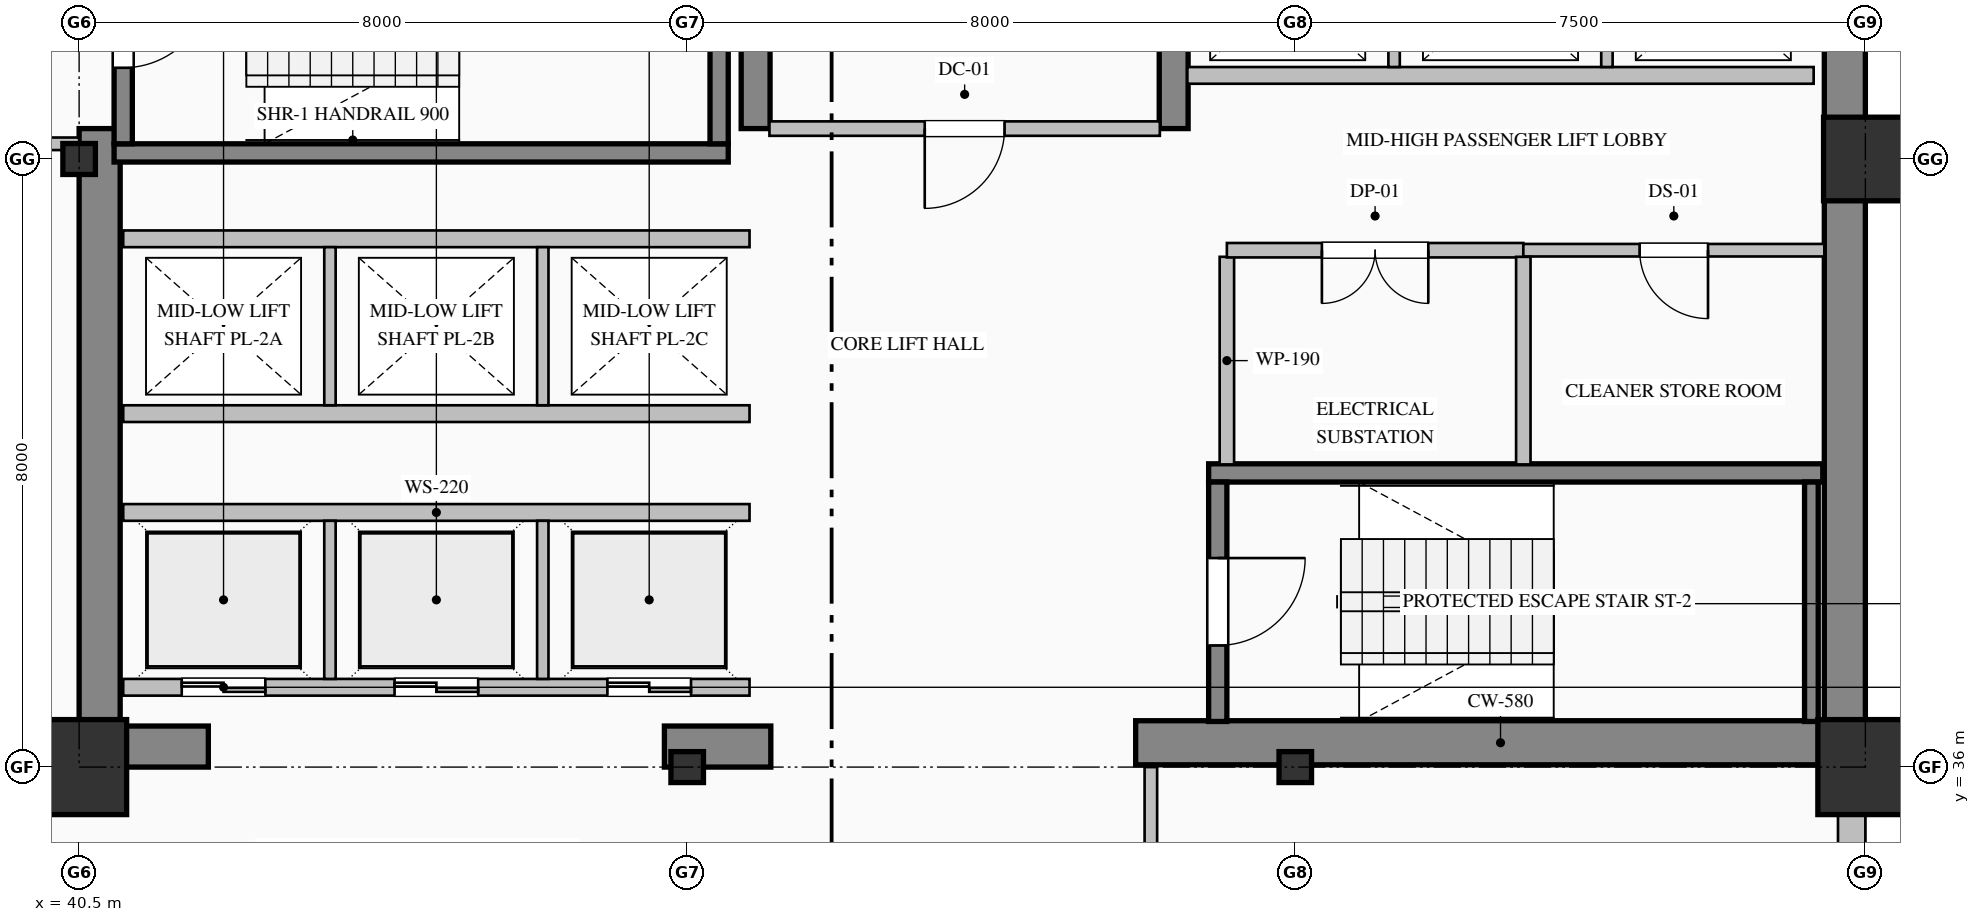
"""IFC4 building model, lengths in metres.
Left out: names, types, materials, properties, quantities, classifications, styles, units other than length and angle.
Written with IfcOpenShell. Run it as: python <this file> out.ifc"""

import sys

from ifc_helpers import new_model, si_unit, direction, frame, frame_2d, origin, origin_2d, place, context, subcontext, project, spatial, rectangle, hollow_rectangle, i_section, extrude, element, fill, save


model = new_model("IFC4")
c1 = context("Model", 3, precision=1e-05, world=origin(), true_north=direction((0.0, 1.0)))
c2 = subcontext(c1, "Body", "Model", "MODEL_VIEW")
j1 = project(units=[si_unit("LENGTHUNIT", "METRE"), si_unit("PLANEANGLEUNIT", "RADIAN")], contexts=[c1])
p1 = place(None, origin())
s1 = spatial("IfcSite", under=j1, at=p1, CompositionType="ELEMENT")
p2 = place(p1, origin())
s2 = spatial("IfcBuilding", under=s1, at=p2, CompositionType="ELEMENT")
p3 = place(p2, frame((0.0, 0.0, 84.2)))
s3 = spatial("IfcBuildingStorey", under=s2, at=p3, CompositionType="ELEMENT", Elevation=84.2)
p4 = place(p3, frame((63.73, 36.32, 0.0), z_axis=(0.0, 0.0, 1.0), x_axis=(0.0, 1.0, 0.0)))
e1 = element("IfcWall", 1, at=p4, inside=s3, PredefinedType="SHEAR", context=c2, shape_type="SweptSolid", body=[
    extrude(rectangle(XDim=15.14, YDim=0.54, at=frame_2d((7.57, 0.0))), origin(), (0.0, 0.0, 1.0), 3.75),
])
p5 = place(p3, frame((40.77, 36.54, 0.0), z_axis=(0.0, 0.0, 1.0), x_axis=(0.0, 1.0, 0.0)))
e2 = element("IfcWall", 2, at=p5, inside=s3, PredefinedType="SHEAR", context=c2, shape_type="SweptSolid", body=[
    extrude(rectangle(XDim=7.86, YDim=0.54, at=frame_2d((3.93, 0.0))), origin(), (0.0, 0.0, 1.0), 3.75),
])
p6 = place(p3, frame((40.5, 36.27, 0.0), z_axis=(0.0, 0.0, 1.0), x_axis=(1.0, 0.0, 0.0)))
e3 = element("IfcWall", 3, at=p6, inside=s3, PredefinedType="SHEAR", context=c2, shape_type="SweptSolid", body=[
    extrude(rectangle(XDim=1.7, YDim=0.54, at=frame_2d((0.85, 0.0))), origin(), (0.0, 0.0, 1.0), 3.75),
])
p7 = place(p3, frame((48.2, 36.27, 0.0), z_axis=(0.0, 0.0, 1.0), x_axis=(1.0, 0.0, 0.0)))
e4 = element("IfcWall", 4, at=p7, inside=s3, PredefinedType="SHEAR", context=c2, shape_type="SweptSolid", body=[
    extrude(rectangle(XDim=1.4, YDim=0.54, at=frame_2d((0.7, 0.0))), origin(), (0.0, 0.0, 1.0), 3.75),
])
p8 = place(p3, frame((54.4, 36.32, 0.0), z_axis=(0.0, 0.0, 1.0), x_axis=(1.0, 0.0, 0.0)))
e5 = element("IfcWall", 5, at=p8, inside=s3, PredefinedType="SHEAR", context=c2, shape_type="SweptSolid", body=[
    extrude(rectangle(XDim=9.6, YDim=0.58, at=frame_2d((4.8, 0.0))), origin(), (0.0, 0.0, 1.0), 4.0),
])
p9 = place(p3, frame((49.4, 44.4, 0.0), z_axis=(0.0, 0.0, 1.0), x_axis=(0.0, 1.0, 0.0)))
e6 = element("IfcWall", 6, at=p9, inside=s3, PredefinedType="SHEAR", context=c2, shape_type="SweptSolid", body=[
    extrude(rectangle(XDim=3.0, YDim=0.38, at=frame_2d((1.5, 0.0))), origin(), (0.0, 0.0, 1.0), 3.75),
])
p10 = place(p3, frame((54.9, 44.4, 0.0), z_axis=(0.0, 0.0, 1.0), x_axis=(0.0, 1.0, 0.0)))
e7 = element("IfcWall", 7, at=p10, inside=s3, PredefinedType="SHEAR", context=c2, shape_type="SweptSolid", body=[
    extrude(rectangle(XDim=7.06, YDim=0.38, at=frame_2d((3.53, 0.0))), origin(), (0.0, 0.0, 1.0), 3.75),
])
p11 = place(p3, frame((40.5, 36.0, 0.0), z_axis=(0.0, 0.0, 1.0), x_axis=(1.0, 0.0, 0.0)))
e8 = element("IfcColumn", 8, at=p11, inside=s3, PredefinedType="COLUMN", context=c2, shape_type="SweptSolid", body=[
    extrude(hollow_rectangle(XDim=1.25, YDim=1.25, WallThickness=0.045, at=origin_2d()), origin(), (0.0, 0.0, 1.0), 4.0),
])
for number, where, z_axis, x_axis in (
    (9, (40.5, 44.0, 0.0), (0.0, 0.0, 1.0), (1.0, 0.0, 0.0)),
    (10, (48.5, 36.0, 0.0), (0.0, 0.0, 1.0), (1.0, 0.0, 0.0)),
    (11, (56.5, 36.0, 0.0), (0.0, 0.0, 1.0), (1.0, 0.0, 0.0)),
):
    element("IfcColumn", number, at=place(p3, frame(where, z_axis=z_axis, x_axis=x_axis)), inside=s3, PredefinedType="COLUMN", context=c2, shape_type="SweptSolid", body=[
        extrude(i_section(OverallWidth=0.407, OverallDepth=0.428, WebThickness=0.02, FlangeThickness=0.035, FilletRadius=0.022, at=origin_2d()), origin(), (0.0, 0.0, 1.0), 4.0),
    ])
p12 = place(p3, frame((64.0, 36.0, 0.0), z_axis=(0.0, 0.0, 1.0), x_axis=(1.0, 0.0, 0.0)))
e12 = element("IfcColumn", 12, at=p12, inside=s3, PredefinedType="COLUMN", context=c2, shape_type="SweptSolid", body=[
    extrude(hollow_rectangle(XDim=1.25, YDim=1.25, WallThickness=0.045, at=origin_2d()), origin(), (0.0, 0.0, 1.0), 4.0),
])
p13 = place(p3, frame((64.0, 44.0, 0.0), z_axis=(0.0, 0.0, 1.0), x_axis=(1.0, 0.0, 0.0)))
e13 = element("IfcColumn", 13, at=p13, inside=s3, PredefinedType="COLUMN", context=c2, shape_type="SweptSolid", body=[
    extrude(hollow_rectangle(XDim=1.1, YDim=1.1, WallThickness=0.04, at=origin_2d()), origin(), (0.0, 0.0, 1.0), 4.0),
])
p14 = place(p3, frame((63.82, 36.05, 0.0), z_axis=(0.0, 0.0, 1.0), x_axis=(0.0, -1.0, 0.0)))
e14 = element("IfcWall", 14, at=p14, inside=s3, PredefinedType="SOLIDWALL", context=c2, shape_type="SweptSolid", body=[
    extrude(rectangle(XDim=28.05, YDim=0.36, at=frame_2d((14.025, 0.0))), origin(), (0.0, 0.0, 1.0), 3.25),
])
p15 = place(p14, frame((2.4, 0.0, 0.8)))
e15 = element("IfcOpeningElement", 15, at=p15, cuts=e14, PredefinedType="OPENING", context=c2, shape_type="SweptSolid", body=[
    extrude(rectangle(XDim=2.4, YDim=2.15, at=frame_2d((1.2, 1.075))), frame((0.0, 0.19, 0.0), z_axis=(0.0, -1.0, 0.0), x_axis=(1.0, 0.0, 0.0)), (0.0, 0.0, 1.0), 0.38),
])
p16 = place(p14, frame((13.2, 0.0, 0.8)))
e16 = element("IfcOpeningElement", 16, at=p16, cuts=e14, PredefinedType="OPENING", context=c2, shape_type="SweptSolid", body=[
    extrude(rectangle(XDim=2.4, YDim=2.15, at=frame_2d((1.2, 1.075))), frame((0.0, 0.19, 0.0), z_axis=(0.0, -1.0, 0.0), x_axis=(1.0, 0.0, 0.0)), (0.0, 0.0, 1.0), 0.38),
])
p17 = place(p3, frame((49.04, 44.08, 0.0), z_axis=(0.0, 0.0, 1.0), x_axis=(-1.0, 0.0, 0.0)))
e17 = element("IfcWall", 17, at=p17, inside=s3, PredefinedType="SOLIDWALL", context=c2, shape_type="SweptSolid", body=[
    extrude(rectangle(XDim=8.08, YDim=0.24, at=frame_2d((4.04, 0.0))), origin(), (0.0, 0.0, 1.0), 4.0),
])
p18 = place(p3, frame((41.08, 47.35, 0.0), z_axis=(0.0, 0.0, 1.0), x_axis=(0.0, -1.0, 0.0)))
e18 = element("IfcWall", 18, at=p18, inside=s3, PredefinedType="SOLIDWALL", context=c2, shape_type="SweptSolid", body=[
    extrude(rectangle(XDim=3.15, YDim=0.24, at=frame_2d((1.575, 0.0))), origin(), (0.0, 0.0, 1.0), 4.0),
])
p19 = place(p18, frame((1.0, 0.0, 0.0)))
e19 = element("IfcOpeningElement", 19, at=p19, cuts=e18, PredefinedType="OPENING", context=c2, shape_type="SweptSolid", body=[
    extrude(rectangle(XDim=1.15, YDim=2.2, at=frame_2d((0.575, 1.1))), frame((0.0, 0.13, 0.0), z_axis=(0.0, -1.0, 0.0), x_axis=(1.0, 0.0, 0.0)), (0.0, 0.0, 1.0), 0.26),
])
p20 = place(p3, frame((48.92, 44.2, 0.0), z_axis=(0.0, 0.0, 1.0), x_axis=(0.0, 1.0, 0.0)))
e20 = element("IfcWall", 20, at=p20, inside=s3, PredefinedType="SOLIDWALL", context=c2, shape_type="SweptSolid", body=[
    extrude(rectangle(XDim=3.15, YDim=0.24, at=frame_2d((1.575, 0.0))), origin(), (0.0, 0.0, 1.0), 4.0),
])
p21 = place(p3, frame((55.36, 39.87, 0.0), z_axis=(0.0, 0.0, 1.0), x_axis=(1.0, 0.0, 0.0)))
e21 = element("IfcWall", 21, at=p21, inside=s3, PredefinedType="SOLIDWALL", context=c2, shape_type="SweptSolid", body=[
    extrude(rectangle(XDim=8.08, YDim=0.24, at=frame_2d((4.04, 0.0))), origin(), (0.0, 0.0, 1.0), 4.0),
])
p22 = place(p3, frame((55.48, 39.75, 0.0), z_axis=(0.0, 0.0, 1.0), x_axis=(0.0, -1.0, 0.0)))
e22 = element("IfcWall", 22, at=p22, inside=s3, PredefinedType="SOLIDWALL", context=c2, shape_type="SweptSolid", body=[
    extrude(rectangle(XDim=3.15, YDim=0.24, at=frame_2d((1.575, 0.0))), origin(), (0.0, 0.0, 1.0), 4.0),
])
p23 = place(p22, frame((1.0, 0.0, 0.0)))
e23 = element("IfcOpeningElement", 23, at=p23, cuts=e22, PredefinedType="OPENING", context=c2, shape_type="SweptSolid", body=[
    extrude(rectangle(XDim=1.15, YDim=2.2, at=frame_2d((0.575, 1.1))), frame((0.0, 0.13, 0.0), z_axis=(0.0, -1.0, 0.0), x_axis=(1.0, 0.0, 0.0)), (0.0, 0.0, 1.0), 0.26),
])
p24 = place(p3, frame((63.29, 36.6, 0.0), z_axis=(0.0, 0.0, 1.0), x_axis=(0.0, 1.0, 0.0)))
e24 = element("IfcWall", 24, at=p24, inside=s3, PredefinedType="SOLIDWALL", context=c2, shape_type="SweptSolid", body=[
    extrude(rectangle(XDim=3.15, YDim=0.18, at=frame_2d((1.575, 0.0))), origin(), (0.0, 0.0, 1.0), 4.0),
])
p25 = place(p3, frame((49.32, 37.05, 0.0), z_axis=(0.0, 0.0, 1.0), x_axis=(-1.0, 0.0, 0.0)))
e25 = element("IfcWall", 25, at=p25, inside=s3, PredefinedType="PARTITIONING", context=c2, shape_type="SweptSolid", body=[
    extrude(rectangle(XDim=8.24, YDim=0.22, at=frame_2d((4.12, 0.0))), origin(), (0.0, 0.0, 1.0), 3.75),
])
p26 = place(p25, frame((6.37, 0.0, 0.0)))
e26 = element("IfcOpeningElement", 26, at=p26, cuts=e25, PredefinedType="OPENING", context=c2, shape_type="SweptSolid", body=[
    extrude(rectangle(XDim=1.1, YDim=2.2, at=frame_2d((0.55, 1.1))), frame((0.0, 0.12, 0.0), z_axis=(0.0, -1.0, 0.0), x_axis=(1.0, 0.0, 0.0)), (0.0, 0.0, 1.0), 0.24),
])
p27 = place(p25, frame((3.57, 0.0, 0.0)))
e27 = element("IfcOpeningElement", 27, at=p27, cuts=e25, PredefinedType="OPENING", context=c2, shape_type="SweptSolid", body=[
    extrude(rectangle(XDim=1.1, YDim=2.2, at=frame_2d((0.55, 1.1))), frame((0.0, 0.12, 0.0), z_axis=(0.0, -1.0, 0.0), x_axis=(1.0, 0.0, 0.0)), (0.0, 0.0, 1.0), 0.24),
])
p28 = place(p25, frame((0.77, 0.0, 0.0)))
e28 = element("IfcOpeningElement", 28, at=p28, cuts=e25, PredefinedType="OPENING", context=c2, shape_type="SweptSolid", body=[
    extrude(rectangle(XDim=1.1, YDim=2.2, at=frame_2d((0.55, 1.1))), frame((0.0, 0.12, 0.0), z_axis=(0.0, -1.0, 0.0), x_axis=(1.0, 0.0, 0.0)), (0.0, 0.0, 1.0), 0.24),
])
p29 = place(p3, frame((41.08, 39.35, 0.0), z_axis=(0.0, 0.0, 1.0), x_axis=(1.0, 0.0, 0.0)))
e29 = element("IfcWall", 29, at=p29, inside=s3, PredefinedType="PARTITIONING", context=c2, shape_type="SweptSolid", body=[
    extrude(rectangle(XDim=8.24, YDim=0.22, at=frame_2d((4.12, 0.0))), origin(), (0.0, 0.0, 1.0), 3.75),
])
for number, where, z_axis, x_axis in (
    (30, (43.8, 37.16, 0.0), (0.0, 0.0, 1.0), (0.0, 1.0, 0.0)),
    (31, (46.6, 37.16, 0.0), (0.0, 0.0, 1.0), (0.0, 1.0, 0.0)),
):
    element("IfcWall", number, at=place(p3, frame(where, z_axis=z_axis, x_axis=x_axis)), inside=s3, PredefinedType="PARTITIONING", context=c2, shape_type="SweptSolid", body=[
        extrude(rectangle(XDim=2.08, YDim=0.15, at=frame_2d((1.04, 0.0))), origin(), (0.0, 0.0, 1.0), 3.75),
    ])
for number, where, z_axis, x_axis in (
    (32, (49.32, 40.65, 0.0), (0.0, 0.0, 1.0), (-1.0, 0.0, 0.0)),
    (33, (41.08, 42.95, 0.0), (0.0, 0.0, 1.0), (1.0, 0.0, 0.0)),
):
    element("IfcWall", number, at=place(p3, frame(where, z_axis=z_axis, x_axis=x_axis)), inside=s3, PredefinedType="PARTITIONING", context=c2, shape_type="SweptSolid", body=[
        extrude(rectangle(XDim=8.24, YDim=0.22, at=frame_2d((4.12, 0.0))), origin(), (0.0, 0.0, 1.0), 3.75),
    ])
for number, where, z_axis, x_axis in (
    (34, (43.8, 40.76, 0.0), (0.0, 0.0, 1.0), (0.0, 1.0, 0.0)),
    (35, (46.6, 40.76, 0.0), (0.0, 0.0, 1.0), (0.0, 1.0, 0.0)),
):
    element("IfcWall", number, at=place(p3, frame(where, z_axis=z_axis, x_axis=x_axis)), inside=s3, PredefinedType="PARTITIONING", context=c2, shape_type="SweptSolid", body=[
        extrude(rectangle(XDim=2.08, YDim=0.15, at=frame_2d((1.04, 0.0))), origin(), (0.0, 0.0, 1.0), 3.75),
    ])
p30 = place(p3, frame((63.32, 45.1, 0.0), z_axis=(0.0, 0.0, 1.0), x_axis=(-1.0, 0.0, 0.0)))
e36 = element("IfcWall", 36, at=p30, inside=s3, PredefinedType="PARTITIONING", context=c2, shape_type="SweptSolid", body=[
    extrude(rectangle(XDim=8.24, YDim=0.22, at=frame_2d((4.12, 0.0))), origin(), (0.0, 0.0, 1.0), 3.75),
])
for number, where, z_axis, x_axis in (
    (37, (57.8, 45.21, 0.0), (0.0, 0.0, 1.0), (0.0, 1.0, 0.0)),
    (38, (60.6, 45.21, 0.0), (0.0, 0.0, 1.0), (0.0, 1.0, 0.0)),
):
    element("IfcWall", number, at=place(p3, frame(where, z_axis=z_axis, x_axis=x_axis)), inside=s3, PredefinedType="PARTITIONING", context=c2, shape_type="SweptSolid", body=[
        extrude(rectangle(XDim=2.03, YDim=0.15, at=frame_2d((1.015, 0.0))), origin(), (0.0, 0.0, 1.0), 3.75),
    ])
p31 = place(p3, frame((40.5, 44.2, 0.0), z_axis=(0.0, 0.0, 1.0), x_axis=(-1.0, 0.0, 0.0)))
e39 = element("IfcWall", 39, at=p31, inside=s3, PredefinedType="PARTITIONING", context=c2, shape_type="SweptSolid", body=[
    extrude(rectangle(XDim=2.7, YDim=0.165, at=frame_2d((1.35, 0.0))), origin(), (0.0, 0.0, 1.0), 3.75),
])
p32 = place(p31, frame((0.825, 0.0, 0.0)))
e40 = element("IfcOpeningElement", 40, at=p32, cuts=e39, PredefinedType="OPENING", context=c2, shape_type="SweptSolid", body=[
    extrude(rectangle(XDim=1.05, YDim=2.15, at=frame_2d((0.525, 1.075))), frame((0.0, 0.093, 0.0), z_axis=(0.0, -1.0, 0.0), x_axis=(1.0, 0.0, 0.0)), (0.0, 0.0, 1.0), 0.185),
])
p33 = place(p3, frame((54.718, 44.4, 0.0), z_axis=(0.0, 0.0, 1.0), x_axis=(-1.0, 0.0, 0.0)))
e41 = element("IfcWall", 41, at=p33, inside=s3, PredefinedType="PARTITIONING", context=c2, shape_type="SweptSolid", body=[
    extrude(rectangle(XDim=5.136, YDim=0.19, at=frame_2d((2.568, 0.0))), origin(), (0.0, 0.0, 1.0), 3.75),
])
p34 = place(p33, frame((2.043, 0.0, 0.0)))
e42 = element("IfcOpeningElement", 42, at=p34, cuts=e41, PredefinedType="OPENING", context=c2, shape_type="SweptSolid", body=[
    extrude(rectangle(XDim=1.05, YDim=2.15, at=frame_2d((0.525, 1.075))), frame((0.0, 0.105, 0.0), z_axis=(0.0, -1.0, 0.0), x_axis=(1.0, 0.0, 0.0)), (0.0, 0.0, 1.0), 0.21),
])
p35 = place(p3, frame((55.6, 42.713, 0.0), z_axis=(0.0, 0.0, 1.0), x_axis=(0.0, -1.0, 0.0)))
e43 = element("IfcWall", 43, at=p35, inside=s3, PredefinedType="PARTITIONING", context=c2, shape_type="SweptSolid", body=[
    extrude(rectangle(XDim=2.731, YDim=0.19, at=frame_2d((1.365, 0.0))), origin(), (0.0, 0.0, 1.0), 3.75),
])
p36 = place(p3, frame((59.5, 42.8, 0.0), z_axis=(0.0, 0.0, 1.0), x_axis=(-1.0, 0.0, 0.0)))
e44 = element("IfcWall", 44, at=p36, inside=s3, PredefinedType="PARTITIONING", context=c2, shape_type="SweptSolid", body=[
    extrude(rectangle(XDim=3.9, YDim=0.19, at=frame_2d((1.95, 0.0))), origin(), (0.0, 0.0, 1.0), 3.75),
])
p37 = place(p36, frame((1.25, 0.0, 0.0)))
e45 = element("IfcOpeningElement", 45, at=p37, cuts=e44, PredefinedType="OPENING", context=c2, shape_type="SweptSolid", body=[
    extrude(rectangle(XDim=1.4, YDim=2.25, at=frame_2d((0.7, 1.125))), frame((0.0, 0.105, 0.0), z_axis=(0.0, -1.0, 0.0), x_axis=(1.0, 0.0, 0.0)), (0.0, 0.0, 1.0), 0.21),
])
p38 = place(p3, frame((63.46, 42.8, 0.0), z_axis=(0.0, 0.0, 1.0), x_axis=(-1.0, 0.0, 0.0)))
e46 = element("IfcWall", 46, at=p38, inside=s3, PredefinedType="PARTITIONING", context=c2, shape_type="SweptSolid", body=[
    extrude(rectangle(XDim=3.96, YDim=0.165, at=frame_2d((1.98, 0.0))), origin(), (0.0, 0.0, 1.0), 3.75),
])
p39 = place(p38, frame((1.53, 0.0, 0.0)))
e47 = element("IfcOpeningElement", 47, at=p39, cuts=e46, PredefinedType="OPENING", context=c2, shape_type="SweptSolid", body=[
    extrude(rectangle(XDim=0.9, YDim=2.15, at=frame_2d((0.45, 1.075))), frame((0.0, 0.093, 0.0), z_axis=(0.0, -1.0, 0.0), x_axis=(1.0, 0.0, 0.0)), (0.0, 0.0, 1.0), 0.185),
])
p40 = place(p3, frame((59.5, 42.713, 0.0), z_axis=(0.0, 0.0, 1.0), x_axis=(0.0, -1.0, 0.0)))
e48 = element("IfcWall", 48, at=p40, inside=s3, PredefinedType="PARTITIONING", context=c2, shape_type="SweptSolid", body=[
    extrude(rectangle(XDim=2.731, YDim=0.19, at=frame_2d((1.365, 0.0))), origin(), (0.0, 0.0, 1.0), 3.75),
])
p41 = place(p3, frame((54.6, 36.0, 0.0), z_axis=(0.0, 0.0, 1.0), x_axis=(0.0, -1.0, 0.0)))
e49 = element("IfcWall", 49, at=p41, inside=s3, PredefinedType="PARTITIONING", context=c2, shape_type="SweptSolid", body=[
    extrude(rectangle(XDim=2.125, YDim=0.165, at=frame_2d((1.063, 0.0))), origin(), (0.0, 0.0, 1.0), 3.75),
])
p42 = place(p19, origin())
e50 = element("IfcDoor", 50, at=p42, inside=s3, OperationType="SINGLE_SWING_LEFT", PredefinedType="DOOR", context=c2, shape_type="SweptSolid", body=[
    extrude(rectangle(XDim=1.15, YDim=2.2, at=frame_2d((0.575, 1.1))), frame((0.0, 0.025, 0.0), z_axis=(0.0, -1.0, 0.0), x_axis=(1.0, 0.0, 0.0)), (0.0, 0.0, 1.0), 0.05),
])
fill(e19, e50)
p43 = place(p23, origin())
e51 = element("IfcDoor", 51, at=p43, inside=s3, OperationType="SINGLE_SWING_LEFT", PredefinedType="DOOR", context=c2, shape_type="SweptSolid", body=[
    extrude(rectangle(XDim=1.15, YDim=2.2, at=frame_2d((0.575, 1.1))), frame((0.0, 0.025, 0.0), z_axis=(0.0, -1.0, 0.0), x_axis=(1.0, 0.0, 0.0)), (0.0, 0.0, 1.0), 0.05),
])
fill(e23, e51)
p44 = place(p26, origin())
e52 = element("IfcDoor", 52, at=p44, inside=s3, OperationType="DOUBLE_DOOR_SLIDING", PredefinedType="DOOR", context=c2, shape_type="SweptSolid", body=[
    extrude(rectangle(XDim=1.1, YDim=2.2, at=frame_2d((0.55, 1.1))), frame((0.0, 0.025, 0.0), z_axis=(0.0, -1.0, 0.0), x_axis=(1.0, 0.0, 0.0)), (0.0, 0.0, 1.0), 0.05),
])
fill(e26, e52)
p45 = place(p27, origin())
e53 = element("IfcDoor", 53, at=p45, inside=s3, OperationType="DOUBLE_DOOR_SLIDING", PredefinedType="DOOR", context=c2, shape_type="SweptSolid", body=[
    extrude(rectangle(XDim=1.1, YDim=2.2, at=frame_2d((0.55, 1.1))), frame((0.0, 0.025, 0.0), z_axis=(0.0, -1.0, 0.0), x_axis=(1.0, 0.0, 0.0)), (0.0, 0.0, 1.0), 0.05),
])
fill(e27, e53)
p46 = place(p28, origin())
e54 = element("IfcDoor", 54, at=p46, inside=s3, OperationType="DOUBLE_DOOR_SLIDING", PredefinedType="DOOR", context=c2, shape_type="SweptSolid", body=[
    extrude(rectangle(XDim=1.1, YDim=2.2, at=frame_2d((0.55, 1.1))), frame((0.0, 0.025, 0.0), z_axis=(0.0, -1.0, 0.0), x_axis=(1.0, 0.0, 0.0)), (0.0, 0.0, 1.0), 0.05),
])
fill(e28, e54)
p47 = place(p34, origin())
e55 = element("IfcDoor", 55, at=p47, inside=s3, OperationType="SINGLE_SWING_RIGHT", PredefinedType="DOOR", context=c2, shape_type="SweptSolid", body=[
    extrude(rectangle(XDim=1.05, YDim=2.15, at=frame_2d((0.525, 1.075))), frame((0.0, 0.025, 0.0), z_axis=(0.0, -1.0, 0.0), x_axis=(1.0, 0.0, 0.0)), (0.0, 0.0, 1.0), 0.05),
])
fill(e42, e55)
p48 = place(p37, origin())
e56 = element("IfcDoor", 56, at=p48, inside=s3, OperationType="DOUBLE_DOOR_SINGLE_SWING", PredefinedType="DOOR", context=c2, shape_type="SweptSolid", body=[
    extrude(rectangle(XDim=1.4, YDim=2.25, at=frame_2d((0.7, 1.125))), frame((0.0, 0.025, 0.0), z_axis=(0.0, -1.0, 0.0), x_axis=(1.0, 0.0, 0.0)), (0.0, 0.0, 1.0), 0.05),
])
fill(e45, e56)
p49 = place(p39, origin())
e57 = element("IfcDoor", 57, at=p49, inside=s3, OperationType="SINGLE_SWING_LEFT", PredefinedType="DOOR", context=c2, shape_type="SweptSolid", body=[
    extrude(rectangle(XDim=0.9, YDim=2.15, at=frame_2d((0.45, 1.075))), frame((0.0, 0.025, 0.0), z_axis=(0.0, -1.0, 0.0), x_axis=(1.0, 0.0, 0.0)), (0.0, 0.0, 1.0), 0.05),
])
fill(e47, e57)
save(model, sys.argv[1])
